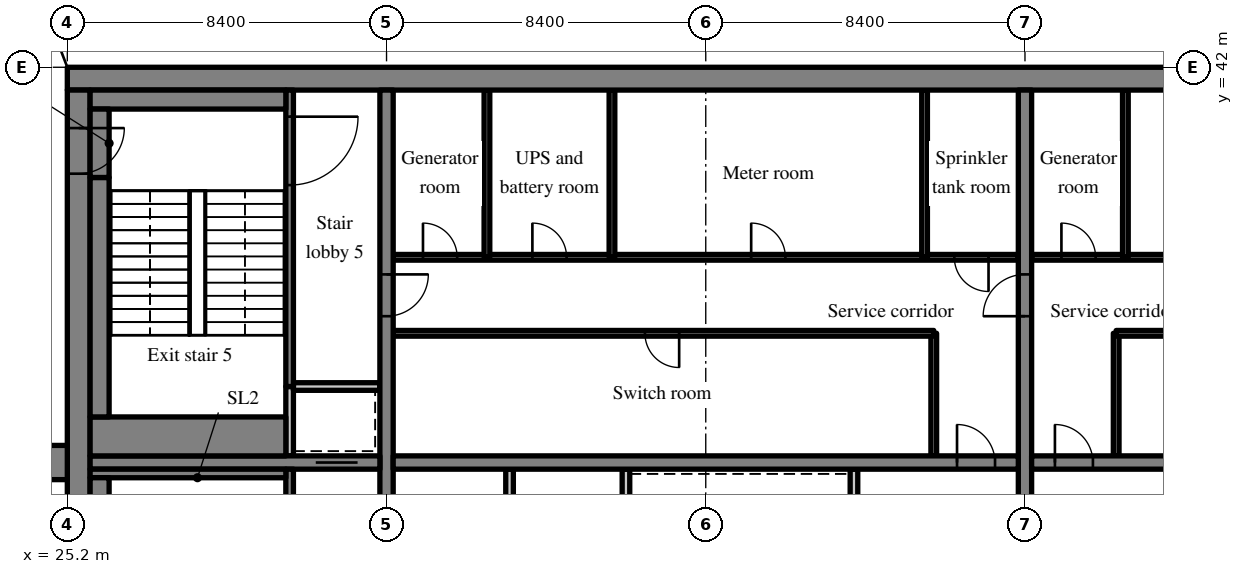
"""IFC4 building model, lengths in metres.
Left out: names, types, materials, properties, quantities, classifications, styles, units other than length and angle.
Written with IfcOpenShell. Run it as: python <this file> out.ifc"""

import sys

from ifc_helpers import new_model, si_unit, direction, frame, frame_2d, origin, place, context, subcontext, project, spatial, rectangle, extrude, source, transform, mapped, element, fill, save


model = new_model("IFC4")
c1 = context("Model", 3, precision=1e-05, world=origin(), true_north=direction((0.0, 1.0)))
c2 = subcontext(c1, "Body", "Model", "MODEL_VIEW")
j1 = project(units=[si_unit("LENGTHUNIT", "METRE"), si_unit("PLANEANGLEUNIT", "RADIAN")], contexts=[c1])
p1 = place(None, origin())
s1 = spatial("IfcSite", under=j1, at=p1, CompositionType="ELEMENT")
p2 = place(p1, origin())
s2 = spatial("IfcBuilding", under=s1, at=p2, CompositionType="ELEMENT")
p3 = place(p2, frame((0.0, 0.0, 264.7)))
s3 = spatial("IfcBuildingStorey", under=s2, at=p3, CompositionType="ELEMENT", Elevation=264.7)
m1 = source(origin(), c2, "Body", "SweptSolid", [
    extrude(rectangle(XDim=50.4, YDim=0.6, at=frame_2d((25.2, 0.0))), origin(), (0.0, 0.0, 1.0), 5.12),
])
p4 = place(p3, frame((25.2, 41.7, 0.0), z_axis=(0.0, 0.0, 1.0), x_axis=(1.0, 0.0, 0.0)))
e1 = element("IfcWall", 1, at=p4, inside=s3, PredefinedType="SHEAR", context=c2, shape_type="MappedRepresentation", body=[
    mapped(m1, transform((0.0, 0.0, 0.0), scale=1.0)),
])
m2 = source(origin(), c2, "Body", "SweptSolid", [
    extrude(rectangle(XDim=18.8, YDim=0.6, at=frame_2d((9.4, 0.0))), origin(), (0.0, 0.0, 1.0), 5.12),
])
p5 = place(p3, frame((25.5, 22.6, 0.0), z_axis=(0.0, 0.0, 1.0), x_axis=(0.0, 1.0, 0.0)))
e2 = element("IfcWall", 2, at=p5, inside=s3, PredefinedType="SHEAR", context=c2, shape_type="MappedRepresentation", body=[
    mapped(m2, transform((0.0, 0.0, 0.0), scale=1.0)),
])
m3 = source(origin(), c2, "Body", "SweptSolid", [
    extrude(rectangle(XDim=1.2, YDim=2.1, at=frame_2d((0.6, 1.05))), frame((0.0, 0.31, 0.0), z_axis=(0.0, -1.0, 0.0), x_axis=(1.0, 0.0, 0.0)), (0.0, 0.0, 1.0), 0.62),
])
p6 = place(p5, frame((16.6, 0.0, 0.0)))
e3 = element("IfcOpeningElement", 3, at=p6, cuts=e2, PredefinedType="OPENING", context=c2, shape_type="MappedRepresentation", body=[
    mapped(m3, transform((0.0, 0.0, 0.0), scale=1.0)),
])
m4 = source(origin(), c2, "Body", "SweptSolid", [
    extrude(rectangle(XDim=18.8, YDim=0.35, at=frame_2d((9.4, 0.0))), origin(), (0.0, 0.0, 1.0), 5.12),
])
p7 = place(p3, frame((33.6, 22.6, 0.0), z_axis=(0.0, 0.0, 1.0), x_axis=(0.0, 1.0, 0.0)))
e4 = element("IfcWall", 4, at=p7, inside=s3, PredefinedType="SHEAR", context=c2, shape_type="MappedRepresentation", body=[
    mapped(m4, transform((0.0, 0.0, 0.0), scale=1.0)),
])
m5 = source(origin(), c2, "Body", "SweptSolid", [
    extrude(rectangle(XDim=1.1, YDim=2.1, at=frame_2d((0.55, 1.05))), frame((0.0, 0.185, 0.0), z_axis=(0.0, -1.0, 0.0), x_axis=(1.0, 0.0, 0.0)), (0.0, 0.0, 1.0), 0.37),
])
p8 = place(p7, frame((12.85, 0.0, 0.0)))
e5 = element("IfcOpeningElement", 5, at=p8, cuts=e4, PredefinedType="OPENING", context=c2, shape_type="MappedRepresentation", body=[
    mapped(m5, transform((0.0, 0.0, 0.0), scale=1.0)),
])
p9 = place(p3, frame((50.4, 22.6, 0.0), z_axis=(0.0, 0.0, 1.0), x_axis=(0.0, 1.0, 0.0)))
e6 = element("IfcWall", 6, at=p9, inside=s3, PredefinedType="SHEAR", context=c2, shape_type="MappedRepresentation", body=[
    mapped(m4, transform((0.0, 0.0, 0.0), scale=1.0)),
])
p10 = place(p9, frame((12.85, 0.0, 0.0)))
e7 = element("IfcOpeningElement", 7, at=p10, cuts=e6, PredefinedType="OPENING", context=c2, shape_type="MappedRepresentation", body=[
    mapped(m5, transform((0.0, 0.0, 0.0), scale=1.0)),
])
m6 = source(origin(), c2, "Body", "SweptSolid", [
    extrude(rectangle(XDim=7.625, YDim=0.35, at=frame_2d((3.812, 0.0))), origin(), (0.0, 0.0, 1.0), 5.12),
])
p11 = place(p3, frame((25.8, 31.6, 0.0), z_axis=(0.0, 0.0, 1.0), x_axis=(1.0, 0.0, 0.0)))
e8 = element("IfcWall", 8, at=p11, inside=s3, PredefinedType="SHEAR", context=c2, shape_type="MappedRepresentation", body=[
    mapped(m6, transform((0.0, 0.0, 0.0), scale=1.0)),
])
p12 = place(p11, frame((5.938, 0.0, 0.0)))
e9 = element("IfcOpeningElement", 9, at=p12, cuts=e8, PredefinedType="OPENING", context=c2, shape_type="MappedRepresentation", body=[
    mapped(m5, transform((0.0, 0.0, 0.0), scale=1.0)),
])
m7 = source(origin(), c2, "Body", "SweptSolid", [
    extrude(rectangle(XDim=16.45, YDim=0.35, at=frame_2d((8.225, 0.0))), origin(), (0.0, 0.0, 1.0), 5.12),
])
p13 = place(p3, frame((33.775, 31.6, 0.0), z_axis=(0.0, 0.0, 1.0), x_axis=(1.0, 0.0, 0.0)))
e10 = element("IfcWall", 10, at=p13, inside=s3, PredefinedType="SHEAR", context=c2, shape_type="MappedRepresentation", body=[
    mapped(m7, transform((0.0, 0.0, 0.0), scale=1.0)),
])
m8 = source(origin(), c2, "Body", "SweptSolid", [
    extrude(rectangle(XDim=1.0, YDim=2.1, at=frame_2d((0.5, 1.05))), frame((0.0, 0.185, 0.0), z_axis=(0.0, -1.0, 0.0), x_axis=(1.0, 0.0, 0.0)), (0.0, 0.0, 1.0), 0.37),
])
p14 = place(p13, frame((14.837, 0.0, 0.0)))
e11 = element("IfcOpeningElement", 11, at=p14, cuts=e10, PredefinedType="OPENING", context=c2, shape_type="MappedRepresentation", body=[
    mapped(m8, transform((0.0, 0.0, 0.0), scale=1.0)),
])
m9 = source(origin(), c2, "Body", "SweptSolid", [
    extrude(rectangle(XDim=16.45, YDim=0.35, at=frame_2d((8.225, 0.0))), origin(), (0.0, 0.0, 1.0), 5.12),
])
p15 = place(p3, frame((50.575, 31.6, 0.0), z_axis=(0.0, 0.0, 1.0), x_axis=(1.0, 0.0, 0.0)))
e12 = element("IfcWall", 12, at=p15, inside=s3, PredefinedType="SHEAR", context=c2, shape_type="MappedRepresentation", body=[
    mapped(m9, transform((0.0, 0.0, 0.0), scale=1.0)),
])
p16 = place(p15, frame((0.613, 0.0, 0.0)))
e13 = element("IfcOpeningElement", 13, at=p16, cuts=e12, PredefinedType="OPENING", context=c2, shape_type="MappedRepresentation", body=[
    mapped(m8, transform((0.0, 0.0, 0.0), scale=1.0)),
])
m10 = source(origin(), c2, "Body", "SweptSolid", [
    extrude(rectangle(XDim=8.1, YDim=0.9, at=frame_2d((4.05, 0.0))), origin(), (0.0, 0.0, 1.0), 5.12),
])
p17 = place(p3, frame((17.1, 31.6, 0.0), z_axis=(0.0, 0.0, 1.0), x_axis=(1.0, 0.0, 0.0)))
e14 = element("IfcWall", 14, at=p17, inside=s3, PredefinedType="SHEAR", context=c2, shape_type="MappedRepresentation", body=[
    mapped(m10, transform((0.0, 0.0, 0.0), scale=1.0)),
])
m11 = source(origin(), c2, "Body", "SweptSolid", [
    extrude(rectangle(XDim=8.825, YDim=0.2, at=frame_2d((4.413, 0.0))), origin(), (0.0, 0.0, 1.0), 5.12),
])
for number, where, z_axis, x_axis in (
    (15, (45.9, 22.6, 0.0), (0.0, 0.0, 1.0), (0.0, 1.0, 0.0)),
    (16, (39.9, 22.6, 0.0), (0.0, 0.0, 1.0), (0.0, 1.0, 0.0)),
    (17, (36.837, 22.6, 0.0), (0.0, 0.0, 1.0), (0.0, 1.0, 0.0)),
):
    element("IfcWall", number, at=place(p3, frame(where, z_axis=z_axis, x_axis=x_axis)), inside=s3, PredefinedType="PARTITIONING", context=c2, shape_type="MappedRepresentation", body=[
        mapped(m11, transform((0.0, 0.0, 0.0), scale=1.0)),
    ])
m12 = source(origin(), c2, "Body", "SweptSolid", [
    extrude(rectangle(XDim=3.225, YDim=0.15, at=frame_2d((1.613, 0.0))), origin(), (0.0, 0.0, 1.0), 5.12),
])
p18 = place(p3, frame((48.0, 31.775, 0.0), z_axis=(0.0, 0.0, 1.0), x_axis=(0.0, 1.0, 0.0)))
e18 = element("IfcWall", 18, at=p18, inside=s3, PredefinedType="PARTITIONING", context=c2, shape_type="MappedRepresentation", body=[
    mapped(m12, transform((0.0, 0.0, 0.0), scale=1.0)),
])
m13 = source(origin(), c2, "Body", "SweptSolid", [
    extrude(rectangle(XDim=14.225, YDim=0.15, at=frame_2d((7.113, 0.0))), origin(), (0.0, 0.0, 1.0), 5.12),
])
p19 = place(p3, frame((33.775, 35.0, 0.0), z_axis=(0.0, 0.0, 1.0), x_axis=(1.0, 0.0, 0.0)))
e19 = element("IfcWall", 19, at=p19, inside=s3, PredefinedType="PARTITIONING", context=c2, shape_type="MappedRepresentation", body=[
    mapped(m13, transform((0.0, 0.0, 0.0), scale=1.0)),
])
m14 = source(origin(), c2, "Body", "SweptSolid", [
    extrude(rectangle(XDim=0.9, YDim=2.1, at=frame_2d((0.45, 1.05))), frame((0.0, 0.085, 0.0), z_axis=(0.0, -1.0, 0.0), x_axis=(1.0, 0.0, 0.0)), (0.0, 0.0, 1.0), 0.17),
])
p20 = place(p19, frame((6.625, 0.0, 0.0)))
e20 = element("IfcOpeningElement", 20, at=p20, cuts=e19, PredefinedType="OPENING", context=c2, shape_type="MappedRepresentation", body=[
    mapped(m14, transform((0.0, 0.0, 0.0), scale=1.0)),
])
m15 = source(origin(), c2, "Body", "SweptSolid", [
    extrude(rectangle(XDim=16.45, YDim=0.15, at=frame_2d((8.225, 0.0))), origin(), (0.0, 0.0, 1.0), 5.12),
])
p21 = place(p3, frame((33.775, 37.0, 0.0), z_axis=(0.0, 0.0, 1.0), x_axis=(1.0, 0.0, 0.0)))
e21 = element("IfcWall", 21, at=p21, inside=s3, PredefinedType="PARTITIONING", context=c2, shape_type="MappedRepresentation", body=[
    mapped(m15, transform((0.0, 0.0, 0.0), scale=1.0)),
])
p22 = place(p21, frame((0.784, 0.0, 0.0)))
e22 = element("IfcOpeningElement", 22, at=p22, cuts=e21, PredefinedType="OPENING", context=c2, shape_type="MappedRepresentation", body=[
    mapped(m14, transform((0.0, 0.0, 0.0), scale=1.0)),
])
p23 = place(p21, frame((3.663, 0.0, 0.0)))
e23 = element("IfcOpeningElement", 23, at=p23, cuts=e21, PredefinedType="OPENING", context=c2, shape_type="MappedRepresentation", body=[
    mapped(m14, transform((0.0, 0.0, 0.0), scale=1.0)),
])
p24 = place(p21, frame((9.42, 0.0, 0.0)))
e24 = element("IfcOpeningElement", 24, at=p24, cuts=e21, PredefinedType="OPENING", context=c2, shape_type="MappedRepresentation", body=[
    mapped(m14, transform((0.0, 0.0, 0.0), scale=1.0)),
])
p25 = place(p21, frame((14.766, 0.0, 0.0)))
e25 = element("IfcOpeningElement", 25, at=p25, cuts=e21, PredefinedType="OPENING", context=c2, shape_type="MappedRepresentation", body=[
    mapped(m14, transform((0.0, 0.0, 0.0), scale=1.0)),
])
m16 = source(origin(), c2, "Body", "SweptSolid", [
    extrude(rectangle(XDim=4.4, YDim=0.15, at=frame_2d((2.2, 0.0))), origin(), (0.0, 0.0, 1.0), 5.12),
])
for number, where, z_axis, x_axis in (
    (26, (36.242, 37.0, 0.0), (0.0, 0.0, 1.0), (0.0, 1.0, 0.0)),
    (27, (39.532, 37.0, 0.0), (0.0, 0.0, 1.0), (0.0, 1.0, 0.0)),
    (28, (47.758, 37.0, 0.0), (0.0, 0.0, 1.0), (0.0, 1.0, 0.0)),
):
    element("IfcWall", number, at=place(p3, frame(where, z_axis=z_axis, x_axis=x_axis)), inside=s3, PredefinedType="PARTITIONING", context=c2, shape_type="MappedRepresentation", body=[
        mapped(m16, transform((0.0, 0.0, 0.0), scale=1.0)),
    ])
p26 = place(p3, frame((52.8, 31.775, 0.0), z_axis=(0.0, 0.0, 1.0), x_axis=(0.0, 1.0, 0.0)))
e29 = element("IfcWall", 29, at=p26, inside=s3, PredefinedType="PARTITIONING", context=c2, shape_type="MappedRepresentation", body=[
    mapped(m12, transform((0.0, 0.0, 0.0), scale=1.0)),
])
m17 = source(origin(), c2, "Body", "SweptSolid", [
    extrude(rectangle(XDim=14.225, YDim=0.15, at=frame_2d((7.112, 0.0))), origin(), (0.0, 0.0, 1.0), 5.12),
])
p27 = place(p3, frame((67.025, 35.0, 0.0), z_axis=(0.0, 0.0, 1.0), x_axis=(-1.0, 0.0, 0.0)))
e30 = element("IfcWall", 30, at=p27, inside=s3, PredefinedType="PARTITIONING", context=c2, shape_type="MappedRepresentation", body=[
    mapped(m17, transform((0.0, 0.0, 0.0), scale=1.0)),
])
p28 = place(p27, frame((3.441, 0.0, 0.0)))
e31 = element("IfcOpeningElement", 31, at=p28, cuts=e30, PredefinedType="OPENING", context=c2, shape_type="MappedRepresentation", body=[
    mapped(m14, transform((0.0, 0.0, 0.0), scale=1.0)),
])
p29 = place(p27, frame((10.516, 0.0, 0.0)))
e32 = element("IfcOpeningElement", 32, at=p29, cuts=e30, PredefinedType="OPENING", context=c2, shape_type="MappedRepresentation", body=[
    mapped(m14, transform((0.0, 0.0, 0.0), scale=1.0)),
])
m18 = source(origin(), c2, "Body", "SweptSolid", [
    extrude(rectangle(XDim=16.45, YDim=0.15, at=frame_2d((8.225, 0.0))), origin(), (0.0, 0.0, 1.0), 5.12),
])
p30 = place(p3, frame((67.025, 37.0, 0.0), z_axis=(0.0, 0.0, 1.0), x_axis=(-1.0, 0.0, 0.0)))
e33 = element("IfcWall", 33, at=p30, inside=s3, PredefinedType="PARTITIONING", context=c2, shape_type="MappedRepresentation", body=[
    mapped(m18, transform((0.0, 0.0, 0.0), scale=1.0)),
])
p31 = place(p30, frame((6.541, 0.0, 0.0)))
e34 = element("IfcOpeningElement", 34, at=p31, cuts=e33, PredefinedType="OPENING", context=c2, shape_type="MappedRepresentation", body=[
    mapped(m14, transform((0.0, 0.0, 0.0), scale=1.0)),
])
p32 = place(p30, frame((14.766, 0.0, 0.0)))
e35 = element("IfcOpeningElement", 35, at=p32, cuts=e33, PredefinedType="OPENING", context=c2, shape_type="MappedRepresentation", body=[
    mapped(m14, transform((0.0, 0.0, 0.0), scale=1.0)),
])
p33 = place(p3, frame((53.042, 37.0, 0.0), z_axis=(0.0, 0.0, 1.0), x_axis=(0.0, 1.0, 0.0)))
e36 = element("IfcWall", 36, at=p33, inside=s3, PredefinedType="PARTITIONING", context=c2, shape_type="MappedRepresentation", body=[
    mapped(m16, transform((0.0, 0.0, 0.0), scale=1.0)),
])
m19 = source(origin(), c2, "Body", "SweptSolid", [
    extrude(rectangle(XDim=8.825, YDim=0.2, at=frame_2d((4.413, 0.0))), origin(), (0.0, 0.0, 1.0), 5.12),
])
p34 = place(p3, frame((31.05, 22.6, 0.0), z_axis=(0.0, 0.0, 1.0), x_axis=(0.0, 1.0, 0.0)))
e37 = element("IfcWall", 37, at=p34, inside=s3, PredefinedType="SOLIDWALL", context=c2, shape_type="MappedRepresentation", body=[
    mapped(m19, transform((0.0, 0.0, 0.0), scale=1.0)),
])
m20 = source(origin(), c2, "Body", "SweptSolid", [
    extrude(rectangle(XDim=1.2, YDim=2.1, at=frame_2d((0.6, 1.05))), frame((0.0, 0.11, 0.0), z_axis=(0.0, -1.0, 0.0), x_axis=(1.0, 0.0, 0.0)), (0.0, 0.0, 1.0), 0.22),
])
p35 = place(p34, frame((6.9, 0.0, 0.0)))
e38 = element("IfcOpeningElement", 38, at=p35, cuts=e37, PredefinedType="OPENING", context=c2, shape_type="MappedRepresentation", body=[
    mapped(m20, transform((0.0, 0.0, 0.0), scale=1.0)),
])
m21 = source(origin(), c2, "Body", "SweptSolid", [
    extrude(rectangle(XDim=1.825, YDim=0.2, at=frame_2d((0.913, 0.0))), origin(), (0.0, 0.0, 1.0), 5.12),
])
p36 = place(p3, frame((31.05, 31.775, 0.0), z_axis=(0.0, 0.0, 1.0), x_axis=(0.0, 1.0, 0.0)))
e39 = element("IfcWall", 39, at=p36, inside=s3, PredefinedType="SOLIDWALL", context=c2, shape_type="MappedRepresentation", body=[
    mapped(m21, transform((0.0, 0.0, 0.0), scale=1.0)),
])
m22 = source(origin(), c2, "Body", "SweptSolid", [
    extrude(rectangle(XDim=2.275, YDim=0.2, at=frame_2d((1.138, 0.0))), origin(), (0.0, 0.0, 1.0), 5.12),
])
p37 = place(p3, frame((31.15, 33.6, 0.0), z_axis=(0.0, 0.0, 1.0), x_axis=(1.0, 0.0, 0.0)))
e40 = element("IfcWall", 40, at=p37, inside=s3, PredefinedType="SOLIDWALL", context=c2, shape_type="MappedRepresentation", body=[
    mapped(m22, transform((0.0, 0.0, 0.0), scale=1.0)),
])
m23 = source(origin(), c2, "Body", "SweptSolid", [
    extrude(rectangle(XDim=7.8, YDim=0.2, at=frame_2d((3.9, 0.0))), origin(), (0.0, 0.0, 1.0), 5.12),
])
p38 = place(p3, frame((31.05, 33.6, 0.0), z_axis=(0.0, 0.0, 1.0), x_axis=(0.0, 1.0, 0.0)))
e41 = element("IfcWall", 41, at=p38, inside=s3, PredefinedType="SOLIDWALL", context=c2, shape_type="MappedRepresentation", body=[
    mapped(m23, transform((0.0, 0.0, 0.0), scale=1.0)),
])
m24 = source(origin(), c2, "Body", "SweptSolid", [
    extrude(rectangle(XDim=1.8, YDim=2.1, at=frame_2d((0.9, 1.05))), frame((0.0, 0.11, 0.0), z_axis=(0.0, -1.0, 0.0), x_axis=(1.0, 0.0, 0.0)), (0.0, 0.0, 1.0), 0.22),
])
p39 = place(p38, frame((5.3, 0.0, 0.0)))
e42 = element("IfcOpeningElement", 42, at=p39, cuts=e41, PredefinedType="OPENING", context=c2, shape_type="MappedRepresentation", body=[
    mapped(m24, transform((0.0, 0.0, 0.0), scale=1.0)),
])
m25 = source(origin(), c2, "Body", "SweptSolid", [
    extrude(rectangle(XDim=5.15, YDim=0.225, at=frame_2d((2.575, 0.0))), origin(), (0.0, 0.0, 1.0), 5.12),
])
p40 = place(p3, frame((25.8, 31.312, 0.0), z_axis=(0.0, 0.0, 1.0), x_axis=(1.0, 0.0, 0.0)))
e43 = element("IfcWall", 43, at=p40, inside=s3, PredefinedType="SOLIDWALL", context=c2, shape_type="MappedRepresentation", body=[
    mapped(m25, transform((0.0, 0.0, 0.0), scale=1.0)),
])
m26 = source(origin(), c2, "Body", "SweptSolid", [
    extrude(rectangle(XDim=8.1, YDim=0.5, at=frame_2d((4.05, 0.0))), origin(), (0.0, 0.0, 1.0), 5.12),
])
p41 = place(p3, frame((26.05, 23.1, 0.0), z_axis=(0.0, 0.0, 1.0), x_axis=(0.0, 1.0, 0.0)))
e44 = element("IfcWall", 44, at=p41, inside=s3, PredefinedType="SOLIDWALL", context=c2, shape_type="MappedRepresentation", body=[
    mapped(m26, transform((0.0, 0.0, 0.0), scale=1.0)),
])
m27 = source(origin(), c2, "Body", "SweptSolid", [
    extrude(rectangle(XDim=5.15, YDim=0.5, at=frame_2d((2.575, 0.0))), origin(), (0.0, 0.0, 1.0), 5.12),
])
p42 = place(p3, frame((25.8, 41.15, 0.0), z_axis=(0.0, 0.0, 1.0), x_axis=(1.0, 0.0, 0.0)))
e45 = element("IfcWall", 45, at=p42, inside=s3, PredefinedType="SOLIDWALL", context=c2, shape_type="MappedRepresentation", body=[
    mapped(m27, transform((0.0, 0.0, 0.0), scale=1.0)),
])
m28 = source(origin(), c2, "Body", "SweptSolid", [
    extrude(rectangle(XDim=5.15, YDim=1.025, at=frame_2d((2.575, 0.0))), origin(), (0.0, 0.0, 1.0), 5.12),
])
p43 = place(p3, frame((25.8, 32.287, 0.0), z_axis=(0.0, 0.0, 1.0), x_axis=(1.0, 0.0, 0.0)))
e46 = element("IfcWall", 46, at=p43, inside=s3, PredefinedType="SOLIDWALL", context=c2, shape_type="MappedRepresentation", body=[
    mapped(m28, transform((0.0, 0.0, 0.0), scale=1.0)),
])
m29 = source(origin(), c2, "Body", "SweptSolid", [
    extrude(rectangle(XDim=6.3, YDim=0.5, at=frame_2d((3.15, 0.0))), origin(), (0.0, 0.0, 1.0), 5.12),
])
p44 = place(p3, frame((26.05, 32.8, 0.0), z_axis=(0.0, 0.0, 1.0), x_axis=(0.0, 1.0, 0.0)))
e47 = element("IfcWall", 47, at=p44, inside=s3, PredefinedType="SOLIDWALL", context=c2, shape_type="MappedRepresentation", body=[
    mapped(m29, transform((0.0, 0.0, 0.0), scale=1.0)),
])
m30 = source(origin(), c2, "Body", "SweptSolid", [
    extrude(rectangle(XDim=1.8, YDim=0.5, at=frame_2d((0.9, 0.0))), origin(), (0.0, 0.0, 1.0), 2.12),
])
p45 = place(p3, frame((26.05, 39.1, 3.0), z_axis=(0.0, 0.0, 1.0), x_axis=(0.0, 1.0, 0.0)))
e48 = element("IfcWall", 48, at=p45, inside=s3, PredefinedType="SOLIDWALL", context=c2, shape_type="MappedRepresentation", body=[
    mapped(m30, transform((0.0, 0.0, 0.0), scale=1.0)),
])
m31 = source(origin(), c2, "Body", "SweptSolid", [
    extrude(rectangle(XDim=1.0, YDim=2.1, at=frame_2d((0.5, 1.05))), frame((0.0, 0.025, 0.0), z_axis=(0.0, -1.0, 0.0), x_axis=(1.0, 0.0, 0.0)), (0.0, 0.0, 1.0), 0.05),
])
p46 = place(p14, origin())
e49 = element("IfcDoor", 49, at=p46, inside=s3, OperationType="SINGLE_SWING_LEFT", PredefinedType="DOOR", context=c2, shape_type="MappedRepresentation", body=[
    mapped(m31, transform((0.0, 0.0, 0.0), scale=1.0)),
])
fill(e11, e49)
m32 = source(origin(), c2, "Body", "SweptSolid", [
    extrude(rectangle(XDim=0.9, YDim=2.1, at=frame_2d((0.45, 1.05))), frame((0.0, 0.025, 0.0), z_axis=(0.0, -1.0, 0.0), x_axis=(1.0, 0.0, 0.0)), (0.0, 0.0, 1.0), 0.05),
])
p47 = place(p20, origin())
e50 = element("IfcDoor", 50, at=p47, inside=s3, OperationType="SINGLE_SWING_RIGHT", PredefinedType="DOOR", context=c2, shape_type="MappedRepresentation", body=[
    mapped(m32, transform((0.0, 0.0, 0.0), scale=1.0)),
])
fill(e20, e50)
p48 = place(p22, origin())
e51 = element("IfcDoor", 51, at=p48, inside=s3, OperationType="SINGLE_SWING_LEFT", PredefinedType="DOOR", context=c2, shape_type="MappedRepresentation", body=[
    mapped(m32, transform((0.0, 0.0, 0.0), scale=1.0)),
])
fill(e22, e51)
p49 = place(p23, origin())
e52 = element("IfcDoor", 52, at=p49, inside=s3, OperationType="SINGLE_SWING_LEFT", PredefinedType="DOOR", context=c2, shape_type="MappedRepresentation", body=[
    mapped(m32, transform((0.0, 0.0, 0.0), scale=1.0)),
])
fill(e23, e52)
p50 = place(p24, origin())
e53 = element("IfcDoor", 53, at=p50, inside=s3, OperationType="SINGLE_SWING_LEFT", PredefinedType="DOOR", context=c2, shape_type="MappedRepresentation", body=[
    mapped(m32, transform((0.0, 0.0, 0.0), scale=1.0)),
])
fill(e24, e53)
p51 = place(p25, origin())
e54 = element("IfcDoor", 54, at=p51, inside=s3, OperationType="SINGLE_SWING_RIGHT", PredefinedType="DOOR", context=c2, shape_type="MappedRepresentation", body=[
    mapped(m32, transform((0.0, 0.0, 0.0), scale=1.0)),
])
fill(e25, e54)
p52 = place(p16, origin())
e55 = element("IfcDoor", 55, at=p52, inside=s3, OperationType="SINGLE_SWING_LEFT", PredefinedType="DOOR", context=c2, shape_type="MappedRepresentation", body=[
    mapped(m31, transform((0.0, 0.0, 0.0), scale=1.0)),
])
fill(e13, e55)
p53 = place(p32, origin())
e56 = element("IfcDoor", 56, at=p53, inside=s3, OperationType="SINGLE_SWING_RIGHT", PredefinedType="DOOR", context=c2, shape_type="MappedRepresentation", body=[
    mapped(m32, transform((0.0, 0.0, 0.0), scale=1.0)),
])
fill(e35, e56)
m33 = source(origin(), c2, "Body", "SweptSolid", [
    extrude(rectangle(XDim=1.1, YDim=2.1, at=frame_2d((0.55, 1.05))), frame((0.0, 0.025, 0.0), z_axis=(0.0, -1.0, 0.0), x_axis=(1.0, 0.0, 0.0)), (0.0, 0.0, 1.0), 0.05),
])
p54 = place(p12, origin())
e57 = element("IfcDoor", 57, at=p54, inside=s3, OperationType="SLIDING_TO_LEFT", PredefinedType="DOOR", context=c2, shape_type="MappedRepresentation", body=[
    mapped(m33, transform((0.0, 0.0, 0.0), scale=1.0)),
])
fill(e9, e57)
m34 = source(origin(), c2, "Body", "SweptSolid", [
    extrude(rectangle(XDim=1.8, YDim=2.1, at=frame_2d((0.9, 1.05))), frame((0.0, 0.025, 0.0), z_axis=(0.0, -1.0, 0.0), x_axis=(1.0, 0.0, 0.0)), (0.0, 0.0, 1.0), 0.05),
])
p55 = place(p39, origin())
e58 = element("IfcDoor", 58, at=p55, inside=s3, OperationType="SINGLE_SWING_RIGHT", PredefinedType="DOOR", context=c2, shape_type="MappedRepresentation", body=[
    mapped(m34, transform((0.0, 0.0, 0.0), scale=1.0)),
])
fill(e42, e58)
p56 = place(p8, origin())
e59 = element("IfcDoor", 59, at=p56, inside=s3, OperationType="SINGLE_SWING_RIGHT", PredefinedType="DOOR", context=c2, shape_type="MappedRepresentation", body=[
    mapped(m33, transform((0.0, 0.0, 0.0), scale=1.0)),
])
fill(e5, e59)
p57 = place(p10, origin())
e60 = element("IfcDoor", 60, at=p57, inside=s3, OperationType="SINGLE_SWING_LEFT", PredefinedType="DOOR", context=c2, shape_type="MappedRepresentation", body=[
    mapped(m33, transform((0.0, 0.0, 0.0), scale=1.0)),
])
fill(e7, e60)
m35 = source(origin(), c2, "Body", "SweptSolid", [
    extrude(rectangle(XDim=1.2, YDim=2.1, at=frame_2d((0.6, 1.05))), frame((0.0, 0.025, 0.0), z_axis=(0.0, -1.0, 0.0), x_axis=(1.0, 0.0, 0.0)), (0.0, 0.0, 1.0), 0.05),
])
p58 = place(p6, origin())
e61 = element("IfcDoor", 61, at=p58, inside=s3, OperationType="SINGLE_SWING_RIGHT", PredefinedType="DOOR", context=c2, shape_type="MappedRepresentation", body=[
    mapped(m35, transform((0.0, 0.0, 0.0), scale=1.0)),
])
fill(e3, e61)
save(model, sys.argv[1])
